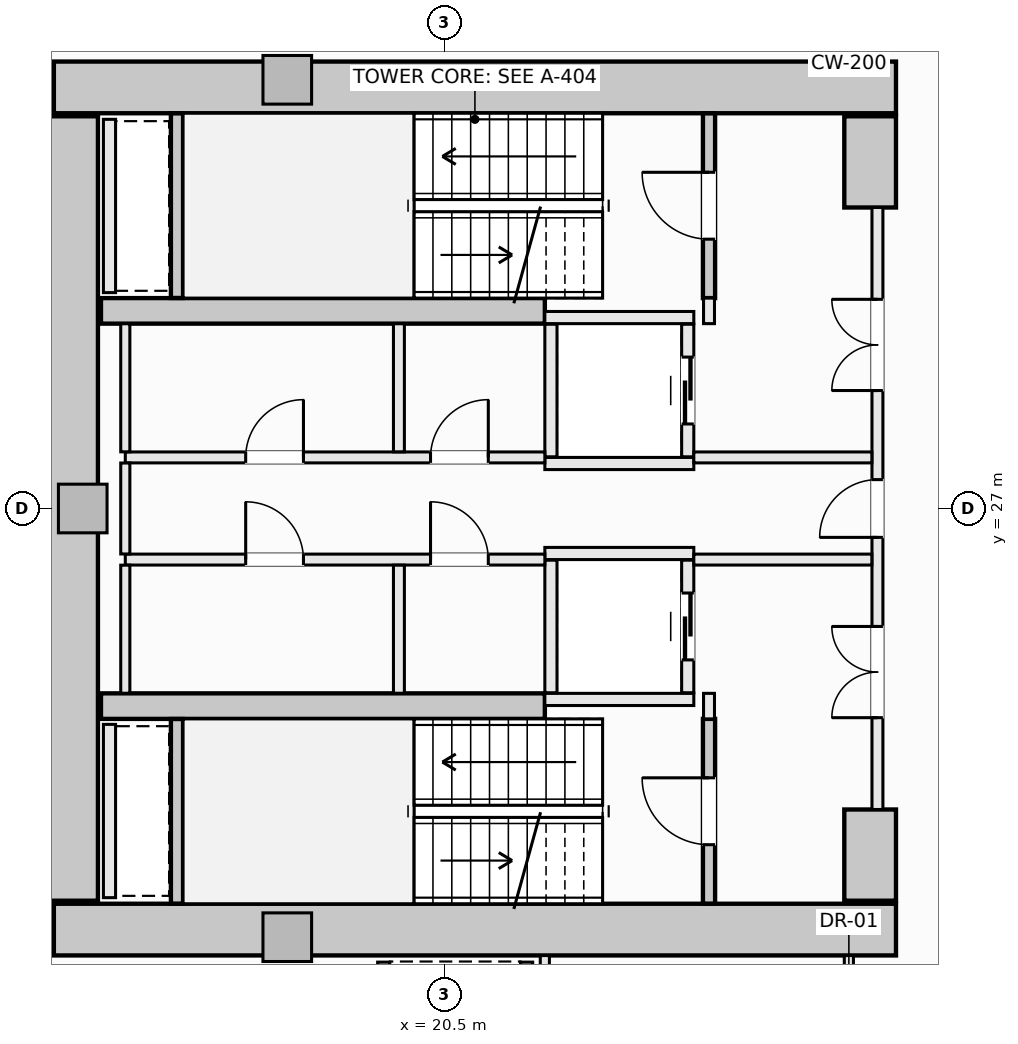
"""IFC4 building model, lengths in metres.
Left out: names, types, materials, properties, quantities, classifications, styles, units other than length and angle.
Written with IfcOpenShell. Run it as: python <this file> out.ifc"""

import sys

from ifc_helpers import new_model, si_unit, direction, frame, frame_2d, origin, origin_2d, place, context, subcontext, project, spatial, rectangle, extrude, element, fill, save


model = new_model("IFC4")
c1 = context("Model", 3, precision=1e-05, world=origin(), true_north=direction((0.0, 1.0)))
c2 = subcontext(c1, "Body", "Model", "MODEL_VIEW")
j1 = project(units=[si_unit("LENGTHUNIT", "METRE"), si_unit("PLANEANGLEUNIT", "RADIAN")], contexts=[c1])
p1 = place(None, origin())
s1 = spatial("IfcSite", under=j1, at=p1, CompositionType="ELEMENT")
p2 = place(p1, origin())
s2 = spatial("IfcBuilding", under=s1, at=p2, CompositionType="ELEMENT")
p3 = place(p2, frame((0.0, 0.0, 61.15)))
s3 = spatial("IfcBuildingStorey", under=s2, at=p3, CompositionType="ELEMENT", Elevation=61.15)
for number, where, z_axis, x_axis in (
    (1, (14.075, 33.925, -0.28), (0.0, 0.0, 1.0), (1.0, 0.0, 0.0)),
    (2, (14.075, 20.075, -0.28), (0.0, 0.0, 1.0), (1.0, 0.0, 0.0)),
):
    element("IfcWall", number, at=place(p3, frame(where, z_axis=z_axis, x_axis=x_axis)), inside=s3, PredefinedType="SHEAR", context=c2, shape_type="SweptSolid", body=[
        extrude(rectangle(XDim=13.85, YDim=0.85, at=frame_2d((6.925, 0.0))), origin(), (0.0, 0.0, 1.0), 3.85),
    ])
p4 = place(p3, frame((14.375, 20.55, -0.28), z_axis=(0.0, 0.0, 1.0), x_axis=(0.0, 1.0, 0.0)))
e3 = element("IfcWall", 3, at=p4, inside=s3, PredefinedType="SHEAR", context=c2, shape_type="SweptSolid", body=[
    extrude(rectangle(XDim=12.9, YDim=0.85, at=frame_2d((6.45, 0.0))), origin(), (0.0, 0.0, 1.0), 3.85),
])
for number, where, z_axis, x_axis in (
    (4, (27.5, 31.95, -0.28), (0.0, 0.0, 1.0), (0.0, 1.0, 0.0)),
    (5, (27.5, 20.55, -0.28), (0.0, 0.0, 1.0), (0.0, 1.0, 0.0)),
):
    element("IfcWall", number, at=place(p3, frame(where, z_axis=z_axis, x_axis=x_axis)), inside=s3, PredefinedType="SHEAR", context=c2, shape_type="SweptSolid", body=[
        extrude(rectangle(XDim=1.5, YDim=0.85, at=frame_2d((0.75, 0.0))), origin(), (0.0, 0.0, 1.0), 3.85),
    ])
for number, where, z_axis, x_axis in (
    (6, (14.85, 30.25, -0.28), (0.0, 0.0, 1.0), (1.0, 0.0, 0.0)),
    (7, (14.85, 23.75, -0.28), (0.0, 0.0, 1.0), (1.0, 0.0, 0.0)),
):
    element("IfcWall", number, at=place(p3, frame(where, z_axis=z_axis, x_axis=x_axis)), inside=s3, PredefinedType="SHEAR", context=c2, shape_type="SweptSolid", body=[
        extrude(rectangle(XDim=7.3, YDim=0.42, at=frame_2d((3.65, 0.0))), origin(), (0.0, 0.0, 1.0), 3.85),
    ])
for number, where, z_axis, x_axis in (
    (8, (17.914, 34.05, -0.28), (0.0, 0.0, 1.0), (1.0, 0.0, 0.0)),
    (9, (14.55, 27.0, -0.28), (0.0, 0.0, 1.0), (1.0, 0.0, 0.0)),
    (10, (17.914, 19.95, -0.28), (0.0, 0.0, 1.0), (1.0, 0.0, 0.0)),
):
    element("IfcColumn", number, at=place(p3, frame(where, z_axis=z_axis, x_axis=x_axis)), inside=s3, PredefinedType="PILASTER", context=c2, shape_type="SweptSolid", body=[
        extrude(rectangle(XDim=0.8, YDim=0.8, at=origin_2d()), origin(), (0.0, 0.0, 1.0), 3.85),
    ])
p5 = place(p3, frame((24.85, 30.46, -0.28), z_axis=(0.0, 0.0, 1.0), x_axis=(0.0, 1.0, 0.0)))
e11 = element("IfcWall", 11, at=p5, inside=s3, PredefinedType="SHEAR", context=c2, shape_type="SweptSolid", body=[
    extrude(rectangle(XDim=3.038, YDim=0.2, at=frame_2d((1.519, 0.0))), origin(), (0.0, 0.0, 1.0), 3.85),
])
p6 = place(p5, frame((0.969, 0.0, 0.28)))
e12 = element("IfcOpeningElement", 12, at=p6, cuts=e11, PredefinedType="OPENING", context=c2, shape_type="SweptSolid", body=[
    extrude(rectangle(XDim=1.1, YDim=2.15, at=frame_2d((0.55, 1.075))), frame((0.0, 0.11, 0.0), z_axis=(0.0, -1.0, 0.0), x_axis=(1.0, 0.0, 0.0)), (0.0, 0.0, 1.0), 0.22),
])
p7 = place(p3, frame((16.1, 30.462, -0.28), z_axis=(0.0, 0.0, 1.0), x_axis=(0.0, 1.0, 0.0)))
e13 = element("IfcWall", 13, at=p7, inside=s3, PredefinedType="SHEAR", context=c2, shape_type="SweptSolid", body=[
    extrude(rectangle(XDim=3.036, YDim=0.2, at=frame_2d((1.518, 0.0))), origin(), (0.0, 0.0, 1.0), 3.85),
])
p8 = place(p3, frame((24.85, 20.502, -0.28), z_axis=(0.0, 0.0, 1.0), x_axis=(0.0, 1.0, 0.0)))
e14 = element("IfcWall", 14, at=p8, inside=s3, PredefinedType="SHEAR", context=c2, shape_type="SweptSolid", body=[
    extrude(rectangle(XDim=3.038, YDim=0.2, at=frame_2d((1.519, 0.0))), origin(), (0.0, 0.0, 1.0), 3.85),
])
p9 = place(p8, frame((0.969, 0.0, 0.28)))
e15 = element("IfcOpeningElement", 15, at=p9, cuts=e14, PredefinedType="OPENING", context=c2, shape_type="SweptSolid", body=[
    extrude(rectangle(XDim=1.1, YDim=2.15, at=frame_2d((0.55, 1.075))), frame((0.0, 0.11, 0.0), z_axis=(0.0, -1.0, 0.0), x_axis=(1.0, 0.0, 0.0)), (0.0, 0.0, 1.0), 0.22),
])
p10 = place(p3, frame((16.1, 20.502, -0.28), z_axis=(0.0, 0.0, 1.0), x_axis=(0.0, 1.0, 0.0)))
e16 = element("IfcWall", 16, at=p10, inside=s3, PredefinedType="SHEAR", context=c2, shape_type="SweptSolid", body=[
    extrude(rectangle(XDim=3.036, YDim=0.2, at=frame_2d((1.518, 0.0))), origin(), (0.0, 0.0, 1.0), 3.85),
])
for number, where, z_axis, x_axis in (
    (17, (22.15, 30.14, 0.0), (0.0, 0.0, 1.0), (1.0, 0.0, 0.0)),
    (18, (22.15, 27.74, 0.0), (0.0, 0.0, 1.0), (1.0, 0.0, 0.0)),
):
    element("IfcWall", number, at=place(p3, frame(where, z_axis=z_axis, x_axis=x_axis)), inside=s3, PredefinedType="SOLIDWALL", context=c2, shape_type="SweptSolid", body=[
        extrude(rectangle(XDim=2.45, YDim=0.2, at=frame_2d((1.225, 0.0))), origin(), (0.0, 0.0, 1.0), 3.57),
    ])
p11 = place(p3, frame((22.25, 27.85, 0.0), z_axis=(0.0, 0.0, 1.0), x_axis=(0.0, 1.0, 0.0)))
e19 = element("IfcWall", 19, at=p11, inside=s3, PredefinedType="SOLIDWALL", context=c2, shape_type="SweptSolid", body=[
    extrude(rectangle(XDim=2.18, YDim=0.2, at=frame_2d((1.09, 0.0))), origin(), (0.0, 0.0, 1.0), 3.57),
])
p12 = place(p3, frame((24.5, 27.85, 0.0), z_axis=(0.0, 0.0, 1.0), x_axis=(0.0, 1.0, 0.0)))
e20 = element("IfcWall", 20, at=p12, inside=s3, PredefinedType="SOLIDWALL", context=c2, shape_type="SweptSolid", body=[
    extrude(rectangle(XDim=2.18, YDim=0.2, at=frame_2d((1.09, 0.0))), origin(), (0.0, 0.0, 1.0), 3.57),
])
p13 = place(p12, frame((0.54, 0.0, 0.0)))
e21 = element("IfcOpeningElement", 21, at=p13, cuts=e20, PredefinedType="OPENING", context=c2, shape_type="SweptSolid", body=[
    extrude(rectangle(XDim=1.1, YDim=2.2, at=frame_2d((0.55, 1.1))), frame((0.0, 0.11, 0.0), z_axis=(0.0, -1.0, 0.0), x_axis=(1.0, 0.0, 0.0)), (0.0, 0.0, 1.0), 0.22),
])
for number, where, z_axis, x_axis in (
    (22, (22.15, 26.26, 0.0), (0.0, 0.0, 1.0), (1.0, 0.0, 0.0)),
    (23, (22.15, 23.86, 0.0), (0.0, 0.0, 1.0), (1.0, 0.0, 0.0)),
):
    element("IfcWall", number, at=place(p3, frame(where, z_axis=z_axis, x_axis=x_axis)), inside=s3, PredefinedType="SOLIDWALL", context=c2, shape_type="SweptSolid", body=[
        extrude(rectangle(XDim=2.45, YDim=0.2, at=frame_2d((1.225, 0.0))), origin(), (0.0, 0.0, 1.0), 3.57),
    ])
p14 = place(p3, frame((22.25, 23.97, 0.0), z_axis=(0.0, 0.0, 1.0), x_axis=(0.0, 1.0, 0.0)))
e24 = element("IfcWall", 24, at=p14, inside=s3, PredefinedType="SOLIDWALL", context=c2, shape_type="SweptSolid", body=[
    extrude(rectangle(XDim=2.18, YDim=0.2, at=frame_2d((1.09, 0.0))), origin(), (0.0, 0.0, 1.0), 3.57),
])
p15 = place(p3, frame((24.5, 23.97, 0.0), z_axis=(0.0, 0.0, 1.0), x_axis=(0.0, 1.0, 0.0)))
e25 = element("IfcWall", 25, at=p15, inside=s3, PredefinedType="SOLIDWALL", context=c2, shape_type="SweptSolid", body=[
    extrude(rectangle(XDim=2.18, YDim=0.2, at=frame_2d((1.09, 0.0))), origin(), (0.0, 0.0, 1.0), 3.57),
])
p16 = place(p15, frame((0.54, 0.0, 0.0)))
e26 = element("IfcOpeningElement", 26, at=p16, cuts=e25, PredefinedType="OPENING", context=c2, shape_type="SweptSolid", body=[
    extrude(rectangle(XDim=1.1, YDim=2.2, at=frame_2d((0.55, 1.1))), frame((0.0, 0.11, 0.0), z_axis=(0.0, -1.0, 0.0), x_axis=(1.0, 0.0, 0.0)), (0.0, 0.0, 1.0), 0.22),
])
for number, where, z_axis, x_axis in (
    (27, (19.5, 17.01, 0.0), (0.0, 0.0, 1.0), (0.0, 1.0, 0.0)),
    (28, (21.85, 17.01, 0.0), (0.0, 0.0, 1.0), (0.0, 1.0, 0.0)),
):
    element("IfcWall", number, at=place(p3, frame(where, z_axis=z_axis, x_axis=x_axis)), inside=s3, PredefinedType="SOLIDWALL", context=c2, shape_type="SweptSolid", body=[
        extrude(rectangle(XDim=2.53, YDim=0.2, at=frame_2d((1.265, 0.0))), origin(), (0.0, 0.0, 1.0), 3.57),
    ])
for number, where, z_axis, x_axis in (
    (29, (14.99, 30.55, 0.0), (0.0, 0.0, 1.0), (0.0, 1.0, 0.0)),
    (30, (14.99, 20.6, 0.0), (0.0, 0.0, 1.0), (0.0, 1.0, 0.0)),
):
    element("IfcWall", number, at=place(p3, frame(where, z_axis=z_axis, x_axis=x_axis)), inside=s3, PredefinedType="SOLIDWALL", context=c2, shape_type="SweptSolid", body=[
        extrude(rectangle(XDim=2.85, YDim=0.2, at=frame_2d((1.425, 0.0))), origin(), (0.0, 0.0, 1.0), 3.57),
    ])
for number, where, z_axis, x_axis in (
    (31, (24.85, 23.54, 0.0), (0.0, 0.0, 1.0), (0.0, 1.0, 0.0)),
    (32, (24.85, 30.04, 0.0), (0.0, 0.0, 1.0), (0.0, 1.0, 0.0)),
):
    element("IfcWall", number, at=place(p3, frame(where, z_axis=z_axis, x_axis=x_axis)), inside=s3, PredefinedType="SOLIDWALL", context=c2, shape_type="SweptSolid", body=[
        extrude(rectangle(XDim=0.42, YDim=0.18, at=frame_2d((0.21, 0.0))), origin(), (0.0, 0.0, 1.0), 3.57),
    ])
p17 = place(p3, frame((27.62, 22.05, 0.0), z_axis=(0.0, 0.0, 1.0), x_axis=(0.0, 1.0, 0.0)))
e33 = element("IfcWall", 33, at=p17, inside=s3, PredefinedType="SOLIDWALL", context=c2, shape_type="SweptSolid", body=[
    extrude(rectangle(XDim=9.9, YDim=0.18, at=frame_2d((4.95, 0.0))), origin(), (0.0, 0.0, 1.0), 2.662),
])
p18 = place(p17, frame((4.475, 0.0, 0.0)))
e34 = element("IfcOpeningElement", 34, at=p18, cuts=e33, PredefinedType="OPENING", context=c2, shape_type="SweptSolid", body=[
    extrude(rectangle(XDim=0.95, YDim=2.1, at=frame_2d((0.475, 1.05))), frame((0.0, 0.1, 0.0), z_axis=(0.0, -1.0, 0.0), x_axis=(1.0, 0.0, 0.0)), (0.0, 0.0, 1.0), 0.2),
])
p19 = place(p17, frame((6.89, 0.0, 0.0)))
e35 = element("IfcOpeningElement", 35, at=p19, cuts=e33, PredefinedType="OPENING", context=c2, shape_type="SweptSolid", body=[
    extrude(rectangle(XDim=1.5, YDim=2.2, at=frame_2d((0.75, 1.1))), frame((0.0, 0.1, 0.0), z_axis=(0.0, -1.0, 0.0), x_axis=(1.0, 0.0, 0.0)), (0.0, 0.0, 1.0), 0.2),
])
p20 = place(p17, frame((1.51, 0.0, 0.0)))
e36 = element("IfcOpeningElement", 36, at=p20, cuts=e33, PredefinedType="OPENING", context=c2, shape_type="SweptSolid", body=[
    extrude(rectangle(XDim=1.5, YDim=2.2, at=frame_2d((0.75, 1.1))), frame((0.0, 0.1, 0.0), z_axis=(0.0, -1.0, 0.0), x_axis=(1.0, 0.0, 0.0)), (0.0, 0.0, 1.0), 0.2),
])
p21 = place(p3, frame((15.25, 27.84, 0.0), z_axis=(0.0, 0.0, 1.0), x_axis=(1.0, 0.0, 0.0)))
e37 = element("IfcWall", 37, at=p21, inside=s3, PredefinedType="SOLIDWALL", context=c2, shape_type="SweptSolid", body=[
    extrude(rectangle(XDim=6.9, YDim=0.18, at=frame_2d((3.45, 0.0))), origin(), (0.0, 0.0, 1.0), 3.57),
])
p22 = place(p21, frame((5.02, 0.0, 0.0)))
e38 = element("IfcOpeningElement", 38, at=p22, cuts=e37, PredefinedType="OPENING", context=c2, shape_type="SweptSolid", body=[
    extrude(rectangle(XDim=0.95, YDim=2.1, at=frame_2d((0.475, 1.05))), frame((0.0, 0.1, 0.0), z_axis=(0.0, -1.0, 0.0), x_axis=(1.0, 0.0, 0.0)), (0.0, 0.0, 1.0), 0.2),
])
p23 = place(p21, frame((1.98, 0.0, 0.0)))
e39 = element("IfcOpeningElement", 39, at=p23, cuts=e37, PredefinedType="OPENING", context=c2, shape_type="SweptSolid", body=[
    extrude(rectangle(XDim=0.95, YDim=2.1, at=frame_2d((0.475, 1.05))), frame((0.0, 0.1, 0.0), z_axis=(0.0, -1.0, 0.0), x_axis=(1.0, 0.0, 0.0)), (0.0, 0.0, 1.0), 0.2),
])
p24 = place(p3, frame((24.6, 27.84, 0.0), z_axis=(0.0, 0.0, 1.0), x_axis=(1.0, 0.0, 0.0)))
e40 = element("IfcWall", 40, at=p24, inside=s3, PredefinedType="SOLIDWALL", context=c2, shape_type="SweptSolid", body=[
    extrude(rectangle(XDim=2.928, YDim=0.18, at=frame_2d((1.464, 0.0))), origin(), (0.0, 0.0, 1.0), 3.57),
])
p25 = place(p3, frame((15.25, 26.16, 0.0), z_axis=(0.0, 0.0, 1.0), x_axis=(1.0, 0.0, 0.0)))
e41 = element("IfcWall", 41, at=p25, inside=s3, PredefinedType="SOLIDWALL", context=c2, shape_type="SweptSolid", body=[
    extrude(rectangle(XDim=6.9, YDim=0.18, at=frame_2d((3.45, 0.0))), origin(), (0.0, 0.0, 1.0), 3.57),
])
p26 = place(p25, frame((5.02, 0.0, 0.0)))
e42 = element("IfcOpeningElement", 42, at=p26, cuts=e41, PredefinedType="OPENING", context=c2, shape_type="SweptSolid", body=[
    extrude(rectangle(XDim=0.95, YDim=2.1, at=frame_2d((0.475, 1.05))), frame((0.0, 0.1, 0.0), z_axis=(0.0, -1.0, 0.0), x_axis=(1.0, 0.0, 0.0)), (0.0, 0.0, 1.0), 0.2),
])
p27 = place(p25, frame((1.98, 0.0, 0.0)))
e43 = element("IfcOpeningElement", 43, at=p27, cuts=e41, PredefinedType="OPENING", context=c2, shape_type="SweptSolid", body=[
    extrude(rectangle(XDim=0.95, YDim=2.1, at=frame_2d((0.475, 1.05))), frame((0.0, 0.1, 0.0), z_axis=(0.0, -1.0, 0.0), x_axis=(1.0, 0.0, 0.0)), (0.0, 0.0, 1.0), 0.2),
])
p28 = place(p3, frame((24.6, 26.16, 0.0), z_axis=(0.0, 0.0, 1.0), x_axis=(1.0, 0.0, 0.0)))
e44 = element("IfcWall", 44, at=p28, inside=s3, PredefinedType="SOLIDWALL", context=c2, shape_type="SweptSolid", body=[
    extrude(rectangle(XDim=2.928, YDim=0.18, at=frame_2d((1.464, 0.0))), origin(), (0.0, 0.0, 1.0), 3.57),
])
p29 = place(p3, frame((15.25, 23.962, 0.0), z_axis=(0.0, 0.0, 1.0), x_axis=(0.0, 1.0, 0.0)))
e45 = element("IfcWall", 45, at=p29, inside=s3, PredefinedType="PARTITIONING", context=c2, shape_type="SweptSolid", body=[
    extrude(rectangle(XDim=2.106, YDim=0.15, at=frame_2d((1.053, 0.0))), origin(), (0.0, 0.0, 1.0), 3.57),
])
p30 = place(p3, frame((15.25, 26.252, 0.0), z_axis=(0.0, 0.0, 1.0), x_axis=(0.0, 1.0, 0.0)))
e46 = element("IfcWall", 46, at=p30, inside=s3, PredefinedType="PARTITIONING", context=c2, shape_type="SweptSolid", body=[
    extrude(rectangle(XDim=1.496, YDim=0.15, at=frame_2d((0.748, 0.0))), origin(), (0.0, 0.0, 1.0), 3.57),
])
p31 = place(p3, frame((15.25, 27.932, 0.0), z_axis=(0.0, 0.0, 1.0), x_axis=(0.0, 1.0, 0.0)))
e47 = element("IfcWall", 47, at=p31, inside=s3, PredefinedType="PARTITIONING", context=c2, shape_type="SweptSolid", body=[
    extrude(rectangle(XDim=2.106, YDim=0.15, at=frame_2d((1.053, 0.0))), origin(), (0.0, 0.0, 1.0), 3.57),
])
for number, where, z_axis, x_axis in (
    (48, (19.75, 23.962, 0.0), (0.0, 0.0, 1.0), (0.0, 1.0, 0.0)),
    (49, (19.75, 27.932, 0.0), (0.0, 0.0, 1.0), (0.0, 1.0, 0.0)),
):
    element("IfcWall", number, at=place(p3, frame(where, z_axis=z_axis, x_axis=x_axis)), inside=s3, PredefinedType="SOLIDWALL", context=c2, shape_type="SweptSolid", body=[
        extrude(rectangle(XDim=2.106, YDim=0.18, at=frame_2d((1.053, 0.0))), origin(), (0.0, 0.0, 1.0), 3.57),
    ])
p32 = place(p3, frame((22.15, 17.127, 0.0), z_axis=(0.0, 0.0, 1.0), x_axis=(0.0, 1.0, 0.0)))
e50 = element("IfcWall", 50, at=p32, inside=s3, PredefinedType="PARTITIONING", context=c2, shape_type="SweptSolid", body=[
    extrude(rectangle(XDim=2.521, YDim=0.15, at=frame_2d((1.26, 0.0))), origin(), (0.0, 0.0, 1.0), 3.57),
])
p33 = place(p3, frame((27.15, 17.127, 0.0), z_axis=(0.0, 0.0, 1.0), x_axis=(0.0, 1.0, 0.0)))
e51 = element("IfcWall", 51, at=p33, inside=s3, PredefinedType="PARTITIONING", context=c2, shape_type="SweptSolid", body=[
    extrude(rectangle(XDim=2.521, YDim=0.15, at=frame_2d((1.26, 0.0))), origin(), (0.0, 0.0, 1.0), 3.57),
])
p34 = place(p33, frame((0.785, 0.0, 0.0)))
e52 = element("IfcOpeningElement", 52, at=p34, cuts=e51, PredefinedType="OPENING", context=c2, shape_type="SweptSolid", body=[
    extrude(rectangle(XDim=0.95, YDim=2.1, at=frame_2d((0.475, 1.05))), frame((0.0, 0.085, 0.0), z_axis=(0.0, -1.0, 0.0), x_axis=(1.0, 0.0, 0.0)), (0.0, 0.0, 1.0), 0.17),
])
p35 = place(p3, frame((27.25, 34.352, 0.0), z_axis=(0.0, 0.0, 1.0), x_axis=(0.0, 1.0, 0.0)))
e53 = element("IfcWall", 53, at=p35, inside=s3, PredefinedType="PARTITIONING", context=c2, shape_type="SweptSolid", body=[
    extrude(rectangle(XDim=0.606, YDim=0.12, at=frame_2d((0.303, 0.0))), origin(), (0.0, 0.0, 1.0), 3.57),
])
p36 = place(p6, origin())
e54 = element("IfcDoor", 54, at=p36, inside=s3, OperationType="SINGLE_SWING_RIGHT", PredefinedType="DOOR", context=c2, shape_type="SweptSolid", body=[
    extrude(rectangle(XDim=1.1, YDim=2.15, at=frame_2d((0.55, 1.075))), frame((0.0, 0.025, 0.0), z_axis=(0.0, -1.0, 0.0), x_axis=(1.0, 0.0, 0.0)), (0.0, 0.0, 1.0), 0.05),
])
fill(e12, e54)
p37 = place(p9, origin())
e55 = element("IfcDoor", 55, at=p37, inside=s3, OperationType="SINGLE_SWING_RIGHT", PredefinedType="DOOR", context=c2, shape_type="SweptSolid", body=[
    extrude(rectangle(XDim=1.1, YDim=2.15, at=frame_2d((0.55, 1.075))), frame((0.0, 0.025, 0.0), z_axis=(0.0, -1.0, 0.0), x_axis=(1.0, 0.0, 0.0)), (0.0, 0.0, 1.0), 0.05),
])
fill(e15, e55)
p38 = place(p13, origin())
e56 = element("IfcDoor", 56, at=p38, inside=s3, OperationType="SLIDING_TO_LEFT", PredefinedType="DOOR", context=c2, shape_type="SweptSolid", body=[
    extrude(rectangle(XDim=1.1, YDim=2.2, at=frame_2d((0.55, 1.1))), frame((0.0, 0.025, 0.0), z_axis=(0.0, -1.0, 0.0), x_axis=(1.0, 0.0, 0.0)), (0.0, 0.0, 1.0), 0.05),
])
fill(e21, e56)
p39 = place(p16, origin())
e57 = element("IfcDoor", 57, at=p39, inside=s3, OperationType="SLIDING_TO_LEFT", PredefinedType="DOOR", context=c2, shape_type="SweptSolid", body=[
    extrude(rectangle(XDim=1.1, YDim=2.2, at=frame_2d((0.55, 1.1))), frame((0.0, 0.025, 0.0), z_axis=(0.0, -1.0, 0.0), x_axis=(1.0, 0.0, 0.0)), (0.0, 0.0, 1.0), 0.05),
])
fill(e26, e57)
p40 = place(p18, origin())
e58 = element("IfcDoor", 58, at=p40, inside=s3, OperationType="SINGLE_SWING_LEFT", PredefinedType="DOOR", context=c2, shape_type="SweptSolid", body=[
    extrude(rectangle(XDim=0.95, YDim=2.1, at=frame_2d((0.475, 1.05))), frame((0.0, 0.025, 0.0), z_axis=(0.0, -1.0, 0.0), x_axis=(1.0, 0.0, 0.0)), (0.0, 0.0, 1.0), 0.05),
])
fill(e34, e58)
p41 = place(p19, origin())
e59 = element("IfcDoor", 59, at=p41, inside=s3, OperationType="DOUBLE_DOOR_SINGLE_SWING", PredefinedType="DOOR", context=c2, shape_type="SweptSolid", body=[
    extrude(rectangle(XDim=1.5, YDim=2.2, at=frame_2d((0.75, 1.1))), frame((0.0, 0.025, 0.0), z_axis=(0.0, -1.0, 0.0), x_axis=(1.0, 0.0, 0.0)), (0.0, 0.0, 1.0), 0.05),
])
fill(e35, e59)
p42 = place(p20, origin())
e60 = element("IfcDoor", 60, at=p42, inside=s3, OperationType="DOUBLE_DOOR_SINGLE_SWING", PredefinedType="DOOR", context=c2, shape_type="SweptSolid", body=[
    extrude(rectangle(XDim=1.5, YDim=2.2, at=frame_2d((0.75, 1.1))), frame((0.0, 0.025, 0.0), z_axis=(0.0, -1.0, 0.0), x_axis=(1.0, 0.0, 0.0)), (0.0, 0.0, 1.0), 0.05),
])
fill(e36, e60)
p43 = place(p22, origin())
e61 = element("IfcDoor", 61, at=p43, inside=s3, OperationType="SINGLE_SWING_RIGHT", PredefinedType="DOOR", context=c2, shape_type="SweptSolid", body=[
    extrude(rectangle(XDim=0.95, YDim=2.1, at=frame_2d((0.475, 1.05))), frame((0.0, 0.025, 0.0), z_axis=(0.0, -1.0, 0.0), x_axis=(1.0, 0.0, 0.0)), (0.0, 0.0, 1.0), 0.05),
])
fill(e38, e61)
p44 = place(p26, origin())
e62 = element("IfcDoor", 62, at=p44, inside=s3, OperationType="SINGLE_SWING_LEFT", PredefinedType="DOOR", context=c2, shape_type="SweptSolid", body=[
    extrude(rectangle(XDim=0.95, YDim=2.1, at=frame_2d((0.475, 1.05))), frame((0.0, 0.025, 0.0), z_axis=(0.0, -1.0, 0.0), x_axis=(1.0, 0.0, 0.0)), (0.0, 0.0, 1.0), 0.05),
])
fill(e42, e62)
p45 = place(p23, origin())
e63 = element("IfcDoor", 63, at=p45, inside=s3, OperationType="SINGLE_SWING_RIGHT", PredefinedType="DOOR", context=c2, shape_type="SweptSolid", body=[
    extrude(rectangle(XDim=0.95, YDim=2.1, at=frame_2d((0.475, 1.05))), frame((0.0, 0.025, 0.0), z_axis=(0.0, -1.0, 0.0), x_axis=(1.0, 0.0, 0.0)), (0.0, 0.0, 1.0), 0.05),
])
fill(e39, e63)
p46 = place(p27, origin())
e64 = element("IfcDoor", 64, at=p46, inside=s3, OperationType="SINGLE_SWING_LEFT", PredefinedType="DOOR", context=c2, shape_type="SweptSolid", body=[
    extrude(rectangle(XDim=0.95, YDim=2.1, at=frame_2d((0.475, 1.05))), frame((0.0, 0.025, 0.0), z_axis=(0.0, -1.0, 0.0), x_axis=(1.0, 0.0, 0.0)), (0.0, 0.0, 1.0), 0.05),
])
fill(e43, e64)
save(model, sys.argv[1])
